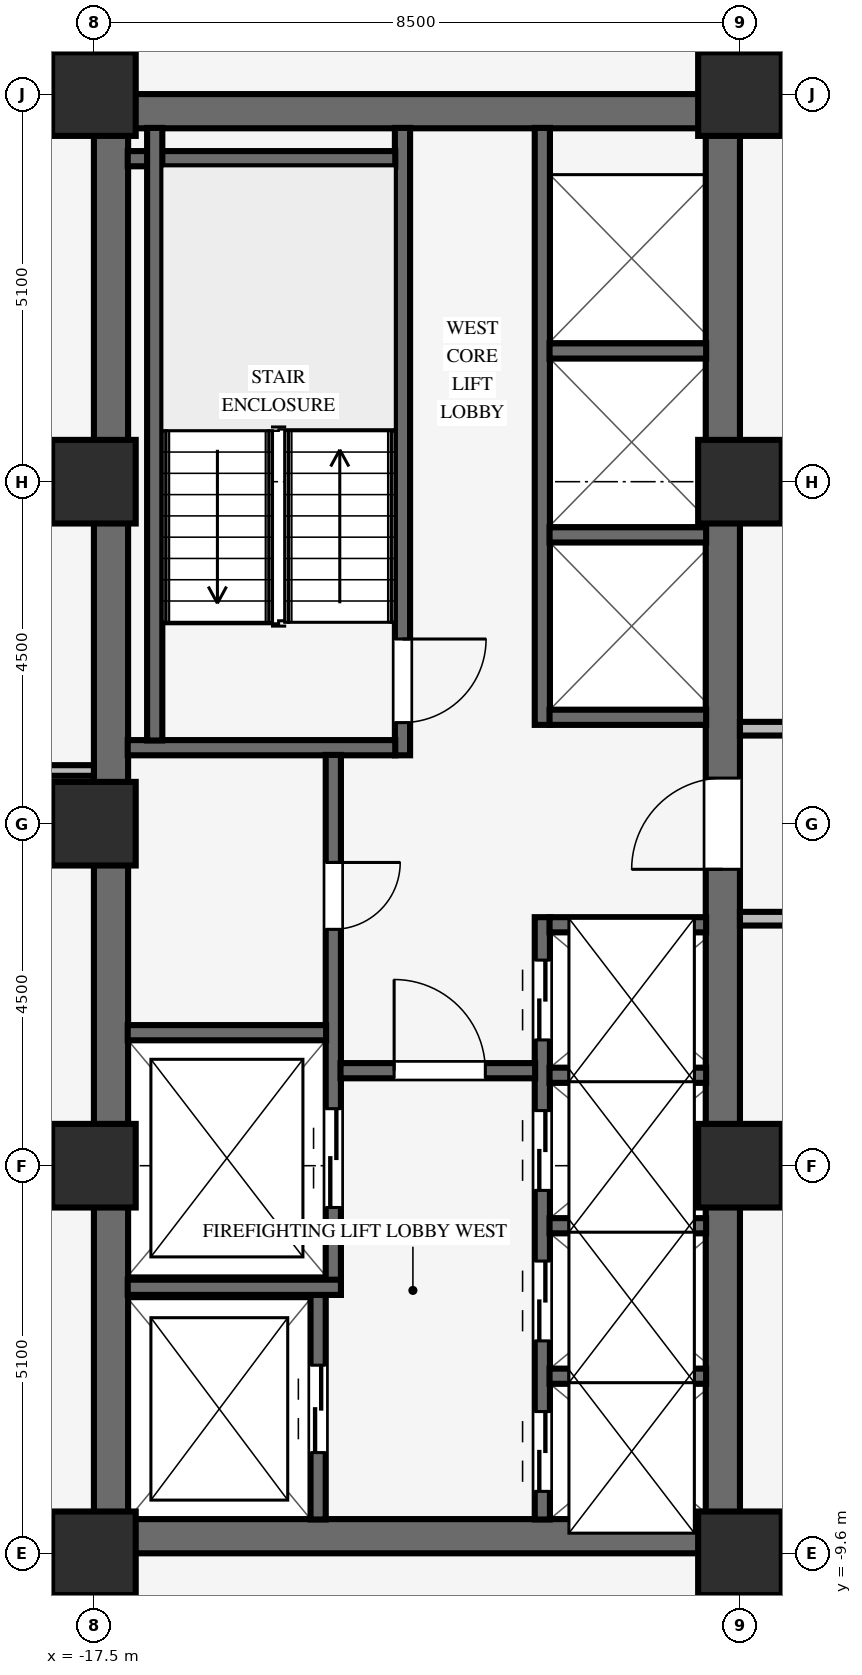
"""IFC4 building model, lengths in metres.
Left out: names, types, materials, properties, quantities, classifications, styles, units other than length and angle.
Written with IfcOpenShell. Run it as: python <this file> out.ifc"""

import sys

from ifc_helpers import new_model, si_unit, direction, frame, frame_2d, origin, origin_2d, place, context, subcontext, project, spatial, rectangle, extrude, source, transform, mapped, element, fill, save


model = new_model("IFC4")
c1 = context("Model", 3, precision=1e-05, world=origin(), true_north=direction((0.0, 1.0)))
c2 = subcontext(c1, "Body", "Model", "MODEL_VIEW")
j1 = project(units=[si_unit("LENGTHUNIT", "METRE"), si_unit("PLANEANGLEUNIT", "RADIAN")], contexts=[c1])
p1 = place(None, origin())
s1 = spatial("IfcSite", under=j1, at=p1, CompositionType="ELEMENT")
p2 = place(p1, origin())
s2 = spatial("IfcBuilding", under=s1, at=p2, CompositionType="ELEMENT")
p3 = place(p2, frame((0.0, 0.0, 78.7)))
s3 = spatial("IfcBuildingStorey", under=s2, at=p3, CompositionType="ELEMENT", Elevation=78.7)
for number, where, z_axis, x_axis in (
    (1, (-17.5, -9.375, 0.0), (0.0, 0.0, 1.0), (1.0, 0.0, 0.0)),
    (2, (-17.5, 9.375, 0.0), (0.0, 0.0, 1.0), (1.0, 0.0, 0.0)),
):
    element("IfcWall", number, at=place(p3, frame(where, z_axis=z_axis, x_axis=x_axis)), inside=s3, PredefinedType="SHEAR", context=c2, shape_type="SweptSolid", body=[
        extrude(rectangle(XDim=8.5, YDim=0.45, at=frame_2d((4.25, 0.0))), origin(), (0.0, 0.0, 1.0), 3.37),
    ])
p4 = place(p3, frame((-17.275, -9.155, 0.0), z_axis=(0.0, 0.0, 1.0), x_axis=(0.0, 1.0, 0.0)))
e3 = element("IfcWall", 3, at=p4, inside=s3, PredefinedType="SHEAR", context=c2, shape_type="SweptSolid", body=[
    extrude(rectangle(XDim=18.31, YDim=0.45, at=frame_2d((9.155, 0.0))), origin(), (0.0, 0.0, 1.0), 3.37),
])
p5 = place(p3, frame((-9.225, -9.155, 0.0), z_axis=(0.0, 0.0, 1.0), x_axis=(0.0, 1.0, 0.0)))
e4 = element("IfcWall", 4, at=p5, inside=s3, PredefinedType="SHEAR", context=c2, shape_type="SweptSolid", body=[
    extrude(rectangle(XDim=18.31, YDim=0.45, at=frame_2d((9.155, 0.0))), origin(), (0.0, 0.0, 1.0), 3.37),
])
p6 = place(p5, frame((8.555, 0.0, 0.0)))
e5 = element("IfcOpeningElement", 5, at=p6, cuts=e4, PredefinedType="OPENING", context=c2, shape_type="SweptSolid", body=[
    extrude(rectangle(XDim=1.2, YDim=2.15, at=frame_2d((0.6, 1.075))), frame((0.0, 0.235, 0.0), z_axis=(0.0, -1.0, 0.0), x_axis=(1.0, 0.0, 0.0)), (0.0, 0.0, 1.0), 0.47),
])
for number, where, z_axis, x_axis in (
    (6, (-17.5, -9.6, 0.0), (0.0, 0.0, 1.0), (1.0, 0.0, 0.0)),
    (7, (-17.5, -4.5, 0.0), (0.0, 0.0, 1.0), (1.0, 0.0, 0.0)),
    (8, (-17.5, 4.5, 0.0), (0.0, 0.0, 1.0), (1.0, 0.0, 0.0)),
    (9, (-17.5, 9.6, 0.0), (0.0, 0.0, 1.0), (1.0, 0.0, 0.0)),
    (10, (-9.0, -9.6, 0.0), (0.0, 0.0, 1.0), (1.0, 0.0, 0.0)),
    (11, (-9.0, -4.5, 0.0), (0.0, 0.0, 1.0), (1.0, 0.0, 0.0)),
    (12, (-9.0, 4.5, 0.0), (0.0, 0.0, 1.0), (1.0, 0.0, 0.0)),
    (13, (-9.0, 9.6, 0.0), (0.0, 0.0, 1.0), (1.0, 0.0, 0.0)),
    (14, (-17.5, 0.0, 0.0), (0.0, 0.0, 1.0), (1.0, 0.0, 0.0)),
):
    element("IfcColumn", number, at=place(p3, frame(where, z_axis=z_axis, x_axis=x_axis)), inside=s3, PredefinedType="COLUMN", context=c2, shape_type="SweptSolid", body=[
        extrude(rectangle(XDim=1.1, YDim=1.1, at=origin_2d()), origin(), (0.0, 0.0, 1.0), 3.37),
    ])
p7 = place(p3, frame((-13.44, 0.9, 0.0), z_axis=(0.0, 0.0, 1.0), x_axis=(0.0, 1.0, 0.0)))
e15 = element("IfcWall", 15, at=p7, inside=s3, PredefinedType="SHEAR", context=c2, shape_type="SweptSolid", body=[
    extrude(rectangle(XDim=8.255, YDim=0.2, at=frame_2d((4.127, 0.0))), origin(), (0.0, 0.0, 1.0), 3.37),
])
p8 = place(p7, frame((1.53, 0.0, 0.0), z_axis=(0.0, 0.0, 1.0), x_axis=(-1.0, 0.0, 0.0)))
e16 = element("IfcOpeningElement", 16, at=p8, cuts=e15, PredefinedType="OPENING", context=c2, shape_type="SweptSolid", body=[
    extrude(rectangle(XDim=1.1, YDim=2.15, at=frame_2d((0.55, 1.075))), frame((0.0, 0.11, 0.0), z_axis=(0.0, -1.0, 0.0), x_axis=(1.0, 0.0, 0.0)), (0.0, 0.0, 1.0), 0.22),
])
for number, where, z_axis, x_axis in (
    (17, (-17.055, 1.0, 0.0), (0.0, 0.0, 1.0), (1.0, 0.0, 0.0)),
    (18, (-17.055, 8.75, 0.0), (0.0, 0.0, 1.0), (1.0, 0.0, 0.0)),
):
    element("IfcWall", number, at=place(p3, frame(where, z_axis=z_axis, x_axis=x_axis)), inside=s3, PredefinedType="SHEAR", context=c2, shape_type="SweptSolid", body=[
        extrude(rectangle(XDim=3.52, YDim=0.2, at=frame_2d((1.76, 0.0))), origin(), (0.0, 0.0, 1.0), 3.37),
    ])
p9 = place(p3, frame((-16.7, 1.095, 0.0), z_axis=(0.0, 0.0, 1.0), x_axis=(0.0, 1.0, 0.0)))
e19 = element("IfcWall", 19, at=p9, inside=s3, PredefinedType="SHEAR", context=c2, shape_type="SweptSolid", body=[
    extrude(rectangle(XDim=8.06, YDim=0.2, at=frame_2d((4.03, 0.0))), origin(), (0.0, 0.0, 1.0), 3.37),
])
p10 = place(p3, frame((-14.55, -9.155, 0.0), z_axis=(0.0, 0.0, 1.0), x_axis=(0.0, 1.0, 0.0)))
e20 = element("IfcWall", 20, at=p10, inside=s3, PredefinedType="SHEAR", context=c2, shape_type="SweptSolid", body=[
    extrude(rectangle(XDim=2.96, YDim=0.2, at=frame_2d((1.48, 0.0))), origin(), (0.0, 0.0, 1.0), 3.37),
])
p11 = place(p10, frame((0.88, 0.0, 0.0)))
e21 = element("IfcOpeningElement", 21, at=p11, cuts=e20, PredefinedType="OPENING", context=c2, shape_type="SweptSolid", body=[
    extrude(rectangle(XDim=1.15, YDim=2.15, at=frame_2d((0.575, 1.075))), frame((0.0, 0.11, 0.0), z_axis=(0.0, -1.0, 0.0), x_axis=(1.0, 0.0, 0.0)), (0.0, 0.0, 1.0), 0.22),
])
p12 = place(p3, frame((-14.35, -6.2, 0.0), z_axis=(0.0, 0.0, 1.0), x_axis=(0.0, 1.0, 0.0)))
e22 = element("IfcWall", 22, at=p12, inside=s3, PredefinedType="SHEAR", context=c2, shape_type="SweptSolid", body=[
    extrude(rectangle(XDim=7.105, YDim=0.2, at=frame_2d((3.552, 0.0))), origin(), (0.0, 0.0, 1.0), 3.37),
])
p13 = place(p12, frame((5.69, 0.0, 0.0), z_axis=(0.0, 0.0, 1.0), x_axis=(-1.0, 0.0, 0.0)))
e23 = element("IfcOpeningElement", 23, at=p13, cuts=e22, PredefinedType="OPENING", context=c2, shape_type="SweptSolid", body=[
    extrude(rectangle(XDim=0.88, YDim=2.1, at=frame_2d((0.44, 1.05))), frame((0.0, 0.11, 0.0), z_axis=(0.0, -1.0, 0.0), x_axis=(1.0, 0.0, 0.0)), (0.0, 0.0, 1.0), 0.22),
])
p14 = place(p12, frame((1.15, 0.0, 0.0)))
e24 = element("IfcOpeningElement", 24, at=p14, cuts=e22, PredefinedType="OPENING", context=c2, shape_type="SweptSolid", body=[
    extrude(rectangle(XDim=1.3, YDim=2.2, at=frame_2d((0.65, 1.1))), frame((0.0, 0.11, 0.0), z_axis=(0.0, -1.0, 0.0), x_axis=(1.0, 0.0, 0.0)), (0.0, 0.0, 1.0), 0.22),
])
p15 = place(p3, frame((-17.055, -6.1, 0.0), z_axis=(0.0, 0.0, 1.0), x_axis=(1.0, 0.0, 0.0)))
e25 = element("IfcWall", 25, at=p15, inside=s3, PredefinedType="SHEAR", context=c2, shape_type="SweptSolid", body=[
    extrude(rectangle(XDim=2.805, YDim=0.2, at=frame_2d((1.402, 0.0))), origin(), (0.0, 0.0, 1.0), 3.37),
])
p16 = place(p3, frame((-17.055, -2.75, 0.0), z_axis=(0.0, 0.0, 1.0), x_axis=(1.0, 0.0, 0.0)))
e26 = element("IfcWall", 26, at=p16, inside=s3, PredefinedType="SHEAR", context=c2, shape_type="SweptSolid", body=[
    extrude(rectangle(XDim=2.61, YDim=0.2, at=frame_2d((1.305, 0.0))), origin(), (0.0, 0.0, 1.0), 3.37),
])
p17 = place(p3, frame((-11.6, -9.155, 0.0), z_axis=(0.0, 0.0, 1.0), x_axis=(0.0, 1.0, 0.0)))
e27 = element("IfcWall", 27, at=p17, inside=s3, PredefinedType="SHEAR", context=c2, shape_type="SweptSolid", body=[
    extrude(rectangle(XDim=7.925, YDim=0.2, at=frame_2d((3.962, 0.0))), origin(), (0.0, 0.0, 1.0), 3.37),
])
p18 = place(p17, frame((0.37, 0.0, 0.0)))
e28 = element("IfcOpeningElement", 28, at=p18, cuts=e27, PredefinedType="OPENING", context=c2, shape_type="SweptSolid", body=[
    extrude(rectangle(XDim=1.05, YDim=2.15, at=frame_2d((0.525, 1.075))), frame((0.0, 0.11, 0.0), z_axis=(0.0, -1.0, 0.0), x_axis=(1.0, 0.0, 0.0)), (0.0, 0.0, 1.0), 0.22),
])
p19 = place(p17, frame((2.35, 0.0, 0.0)))
e29 = element("IfcOpeningElement", 29, at=p19, cuts=e27, PredefinedType="OPENING", context=c2, shape_type="SweptSolid", body=[
    extrude(rectangle(XDim=1.05, YDim=2.15, at=frame_2d((0.525, 1.075))), frame((0.0, 0.11, 0.0), z_axis=(0.0, -1.0, 0.0), x_axis=(1.0, 0.0, 0.0)), (0.0, 0.0, 1.0), 0.22),
])
p20 = place(p17, frame((4.33, 0.0, 0.0)))
e30 = element("IfcOpeningElement", 30, at=p20, cuts=e27, PredefinedType="OPENING", context=c2, shape_type="SweptSolid", body=[
    extrude(rectangle(XDim=1.05, YDim=2.15, at=frame_2d((0.525, 1.075))), frame((0.0, 0.11, 0.0), z_axis=(0.0, -1.0, 0.0), x_axis=(1.0, 0.0, 0.0)), (0.0, 0.0, 1.0), 0.22),
])
p21 = place(p17, frame((6.31, 0.0, 0.0)))
e31 = element("IfcOpeningElement", 31, at=p21, cuts=e27, PredefinedType="OPENING", context=c2, shape_type="SweptSolid", body=[
    extrude(rectangle(XDim=1.05, YDim=2.15, at=frame_2d((0.525, 1.075))), frame((0.0, 0.11, 0.0), z_axis=(0.0, -1.0, 0.0), x_axis=(1.0, 0.0, 0.0)), (0.0, 0.0, 1.0), 0.22),
])
p22 = place(p3, frame((-14.255, -3.25, 0.0), z_axis=(0.0, 0.0, 1.0), x_axis=(1.0, 0.0, 0.0)))
e32 = element("IfcWall", 32, at=p22, inside=s3, PredefinedType="SHEAR", context=c2, shape_type="SweptSolid", body=[
    extrude(rectangle(XDim=2.56, YDim=0.2, at=frame_2d((1.28, 0.0))), origin(), (0.0, 0.0, 1.0), 3.37),
])
p23 = place(p22, frame((0.705, 0.0, 0.0)))
e33 = element("IfcOpeningElement", 33, at=p23, cuts=e32, PredefinedType="OPENING", context=c2, shape_type="SweptSolid", body=[
    extrude(rectangle(XDim=1.2, YDim=2.15, at=frame_2d((0.6, 1.075))), frame((0.0, 0.11, 0.0), z_axis=(0.0, -1.0, 0.0), x_axis=(1.0, 0.0, 0.0)), (0.0, 0.0, 1.0), 0.22),
])
for number, where, z_axis, x_axis in (
    (34, (-11.505, -7.27, 0.0), (0.0, 0.0, 1.0), (1.0, 0.0, 0.0)),
    (35, (-11.505, -5.29, 0.0), (0.0, 0.0, 1.0), (1.0, 0.0, 0.0)),
    (36, (-11.505, -3.31, 0.0), (0.0, 0.0, 1.0), (1.0, 0.0, 0.0)),
    (37, (-11.505, -1.33, 0.0), (0.0, 0.0, 1.0), (1.0, 0.0, 0.0)),
):
    element("IfcWall", number, at=place(p3, frame(where, z_axis=z_axis, x_axis=x_axis)), inside=s3, PredefinedType="SHEAR", context=c2, shape_type="SweptSolid", body=[
        extrude(rectangle(XDim=2.06, YDim=0.2, at=frame_2d((1.03, 0.0))), origin(), (0.0, 0.0, 1.0), 3.37),
    ])
p24 = place(p3, frame((-11.6, 1.3, 0.0), z_axis=(0.0, 0.0, 1.0), x_axis=(0.0, 1.0, 0.0)))
e38 = element("IfcWall", 38, at=p24, inside=s3, PredefinedType="SHEAR", context=c2, shape_type="SweptSolid", body=[
    extrude(rectangle(XDim=7.855, YDim=0.2, at=frame_2d((3.927, 0.0))), origin(), (0.0, 0.0, 1.0), 3.37),
])
for number, where, z_axis, x_axis in (
    (39, (-11.505, 1.4, 0.0), (0.0, 0.0, 1.0), (1.0, 0.0, 0.0)),
    (40, (-11.505, 3.8, 0.0), (0.0, 0.0, 1.0), (1.0, 0.0, 0.0)),
    (41, (-11.505, 6.22, 0.0), (0.0, 0.0, 1.0), (1.0, 0.0, 0.0)),
):
    element("IfcWall", number, at=place(p3, frame(where, z_axis=z_axis, x_axis=x_axis)), inside=s3, PredefinedType="SHEAR", context=c2, shape_type="SweptSolid", body=[
        extrude(rectangle(XDim=2.06, YDim=0.2, at=frame_2d((1.03, 0.0))), origin(), (0.0, 0.0, 1.0), 3.37),
    ])
p25 = place(p3, frame((-8.454, -9.6, 0.0), z_axis=(0.0, 0.0, 1.0), x_axis=(1.0, 0.0, 0.0)))
e42 = element("IfcWall", 42, at=p25, inside=s3, PredefinedType="PARTITIONING", context=c2, shape_type="SweptSolid", body=[
    extrude(rectangle(XDim=5.254, YDim=0.18, at=frame_2d((2.627, 0.0))), origin(), (0.0, 0.0, 1.0), 2.405),
])
p26 = place(p25, frame((2.147, 0.0, 0.0)))
e43 = element("IfcOpeningElement", 43, at=p26, cuts=e42, PredefinedType="OPENING", context=c2, shape_type="SweptSolid", body=[
    extrude(rectangle(XDim=0.96, YDim=2.1, at=frame_2d((0.48, 1.05))), frame((0.0, 0.1, 0.0), z_axis=(0.0, -1.0, 0.0), x_axis=(1.0, 0.0, 0.0)), (0.0, 0.0, 1.0), 0.2),
])
p27 = place(p3, frame((-8.454, -4.8, 0.0), z_axis=(0.0, 0.0, 1.0), x_axis=(1.0, 0.0, 0.0)))
e44 = element("IfcWall", 44, at=p27, inside=s3, PredefinedType="PARTITIONING", context=c2, shape_type="SweptSolid", body=[
    extrude(rectangle(XDim=5.168, YDim=0.14, at=frame_2d((2.584, 0.0))), origin(), (0.0, 0.0, 1.0), 2.738),
])
p28 = place(p3, frame((-9.0, -1.25, 0.0), z_axis=(0.0, 0.0, 1.0), x_axis=(1.0, 0.0, 0.0)))
e45 = element("IfcWall", 45, at=p28, inside=s3, PredefinedType="PARTITIONING", context=c2, shape_type="SweptSolid", body=[
    extrude(rectangle(XDim=5.8, YDim=0.18, at=frame_2d((2.9, 0.0))), origin(), (0.0, 0.0, 1.0), 3.36),
])
p29 = place(p28, frame((2.42, 0.0, 0.0)))
e46 = element("IfcOpeningElement", 46, at=p29, cuts=e45, PredefinedType="OPENING", context=c2, shape_type="SweptSolid", body=[
    extrude(rectangle(XDim=0.96, YDim=2.1, at=frame_2d((0.48, 1.05))), frame((0.0, 0.1, 0.0), z_axis=(0.0, -1.0, 0.0), x_axis=(1.0, 0.0, 0.0)), (0.0, 0.0, 1.0), 0.2),
])
p30 = place(p3, frame((-21.16, 0.7, 0.0), z_axis=(0.0, 0.0, 1.0), x_axis=(1.0, 0.0, 0.0)))
e47 = element("IfcWall", 47, at=p30, inside=s3, PredefinedType="PARTITIONING", context=c2, shape_type="SweptSolid", body=[
    extrude(rectangle(XDim=3.66, YDim=0.14, at=frame_2d((1.83, 0.0))), origin(), (0.0, 0.0, 1.0), 3.36),
])
p31 = place(p3, frame((-9.0, 1.25, 0.0), z_axis=(0.0, 0.0, 1.0), x_axis=(1.0, 0.0, 0.0)))
e48 = element("IfcWall", 48, at=p31, inside=s3, PredefinedType="PARTITIONING", context=c2, shape_type="SweptSolid", body=[
    extrude(rectangle(XDim=5.8, YDim=0.18, at=frame_2d((2.9, 0.0))), origin(), (0.0, 0.0, 1.0), 3.36),
])
p32 = place(p3, frame((-8.454, 9.6, 0.0), z_axis=(0.0, 0.0, 1.0), x_axis=(1.0, 0.0, 0.0)))
e49 = element("IfcWall", 49, at=p32, inside=s3, PredefinedType="PARTITIONING", context=c2, shape_type="SweptSolid", body=[
    extrude(rectangle(XDim=5.254, YDim=0.18, at=frame_2d((2.627, 0.0))), origin(), (0.0, 0.0, 1.0), 2.405),
])
for number, where, z_axis, x_axis in (
    (50, (-17.5, -11.114, 0.0), (0.0, 0.0, 1.0), (0.0, 1.0, 0.0)),
    (51, (-17.5, 10.146, 0.0), (0.0, 0.0, 1.0), (0.0, 1.0, 0.0)),
):
    element("IfcWall", number, at=place(p3, frame(where, z_axis=z_axis, x_axis=x_axis)), inside=s3, PredefinedType="PARTITIONING", context=c2, shape_type="SweptSolid", body=[
        extrude(rectangle(XDim=0.968, YDim=0.18, at=frame_2d((0.484, 0.0))), origin(), (0.0, 0.0, 1.0), 2.738),
    ])
m1 = source(origin(), c2, "Body", "SweptSolid", [
    extrude(rectangle(XDim=1.1, YDim=2.15, at=frame_2d((0.55, 1.075))), frame((0.0, 0.025, 0.0), z_axis=(0.0, -1.0, 0.0), x_axis=(1.0, 0.0, 0.0)), (0.0, 0.0, 1.0), 0.05),
])
p33 = place(p8, origin())
e52 = element("IfcDoor", 52, at=p33, inside=s3, OperationType="SINGLE_SWING_LEFT", PredefinedType="DOOR", context=c2, shape_type="MappedRepresentation", body=[
    mapped(m1, transform((0.0, 0.0, 0.0), scale=1.0)),
])
fill(e16, e52)
m2 = source(origin(), c2, "Body", "SweptSolid", [
    extrude(rectangle(XDim=0.88, YDim=2.1, at=frame_2d((0.44, 1.05))), frame((0.0, 0.025, 0.0), z_axis=(0.0, -1.0, 0.0), x_axis=(1.0, 0.0, 0.0)), (0.0, 0.0, 1.0), 0.05),
])
p34 = place(p13, origin())
e53 = element("IfcDoor", 53, at=p34, inside=s3, OperationType="SINGLE_SWING_LEFT", PredefinedType="DOOR", context=c2, shape_type="MappedRepresentation", body=[
    mapped(m2, transform((0.0, 0.0, 0.0), scale=1.0)),
])
fill(e23, e53)
m3 = source(origin(), c2, "Body", "SweptSolid", [
    extrude(rectangle(XDim=1.2, YDim=2.15, at=frame_2d((0.6, 1.075))), frame((0.0, 0.025, 0.0), z_axis=(0.0, -1.0, 0.0), x_axis=(1.0, 0.0, 0.0)), (0.0, 0.0, 1.0), 0.05),
])
p35 = place(p23, origin())
e54 = element("IfcDoor", 54, at=p35, inside=s3, OperationType="SINGLE_SWING_LEFT", PredefinedType="DOOR", context=c2, shape_type="MappedRepresentation", body=[
    mapped(m3, transform((0.0, 0.0, 0.0), scale=1.0)),
])
fill(e33, e54)
p36 = place(p6, origin())
e55 = element("IfcDoor", 55, at=p36, inside=s3, OperationType="SINGLE_SWING_LEFT", PredefinedType="DOOR", context=c2, shape_type="MappedRepresentation", body=[
    mapped(m3, transform((0.0, 0.0, 0.0), scale=1.0)),
])
fill(e5, e55)
m4 = source(origin(), c2, "Body", "SweptSolid", [
    extrude(rectangle(XDim=1.15, YDim=2.15, at=frame_2d((0.575, 1.075))), frame((0.0, 0.025, 0.0), z_axis=(0.0, -1.0, 0.0), x_axis=(1.0, 0.0, 0.0)), (0.0, 0.0, 1.0), 0.05),
])
p37 = place(p11, origin())
e56 = element("IfcDoor", 56, at=p37, inside=s3, OperationType="DOUBLE_DOOR_SLIDING", PredefinedType="DOOR", context=c2, shape_type="MappedRepresentation", body=[
    mapped(m4, transform((0.0, 0.0, 0.0), scale=1.0)),
])
fill(e21, e56)
m5 = source(origin(), c2, "Body", "SweptSolid", [
    extrude(rectangle(XDim=1.3, YDim=2.2, at=frame_2d((0.65, 1.1))), frame((0.0, 0.025, 0.0), z_axis=(0.0, -1.0, 0.0), x_axis=(1.0, 0.0, 0.0)), (0.0, 0.0, 1.0), 0.05),
])
p38 = place(p14, origin())
e57 = element("IfcDoor", 57, at=p38, inside=s3, OperationType="DOUBLE_DOOR_SLIDING", PredefinedType="DOOR", context=c2, shape_type="MappedRepresentation", body=[
    mapped(m5, transform((0.0, 0.0, 0.0), scale=1.0)),
])
fill(e24, e57)
m6 = source(origin(), c2, "Body", "SweptSolid", [
    extrude(rectangle(XDim=1.05, YDim=2.15, at=frame_2d((0.525, 1.075))), frame((0.0, 0.025, 0.0), z_axis=(0.0, -1.0, 0.0), x_axis=(1.0, 0.0, 0.0)), (0.0, 0.0, 1.0), 0.05),
])
p39 = place(p18, origin())
e58 = element("IfcDoor", 58, at=p39, inside=s3, OperationType="DOUBLE_DOOR_SLIDING", PredefinedType="DOOR", context=c2, shape_type="MappedRepresentation", body=[
    mapped(m6, transform((0.0, 0.0, 0.0), scale=1.0)),
])
fill(e28, e58)
p40 = place(p19, origin())
e59 = element("IfcDoor", 59, at=p40, inside=s3, OperationType="DOUBLE_DOOR_SLIDING", PredefinedType="DOOR", context=c2, shape_type="MappedRepresentation", body=[
    mapped(m6, transform((0.0, 0.0, 0.0), scale=1.0)),
])
fill(e29, e59)
p41 = place(p20, origin())
e60 = element("IfcDoor", 60, at=p41, inside=s3, OperationType="DOUBLE_DOOR_SLIDING", PredefinedType="DOOR", context=c2, shape_type="MappedRepresentation", body=[
    mapped(m6, transform((0.0, 0.0, 0.0), scale=1.0)),
])
fill(e30, e60)
p42 = place(p21, origin())
e61 = element("IfcDoor", 61, at=p42, inside=s3, OperationType="DOUBLE_DOOR_SLIDING", PredefinedType="DOOR", context=c2, shape_type="MappedRepresentation", body=[
    mapped(m6, transform((0.0, 0.0, 0.0), scale=1.0)),
])
fill(e31, e61)
save(model, sys.argv[1])
